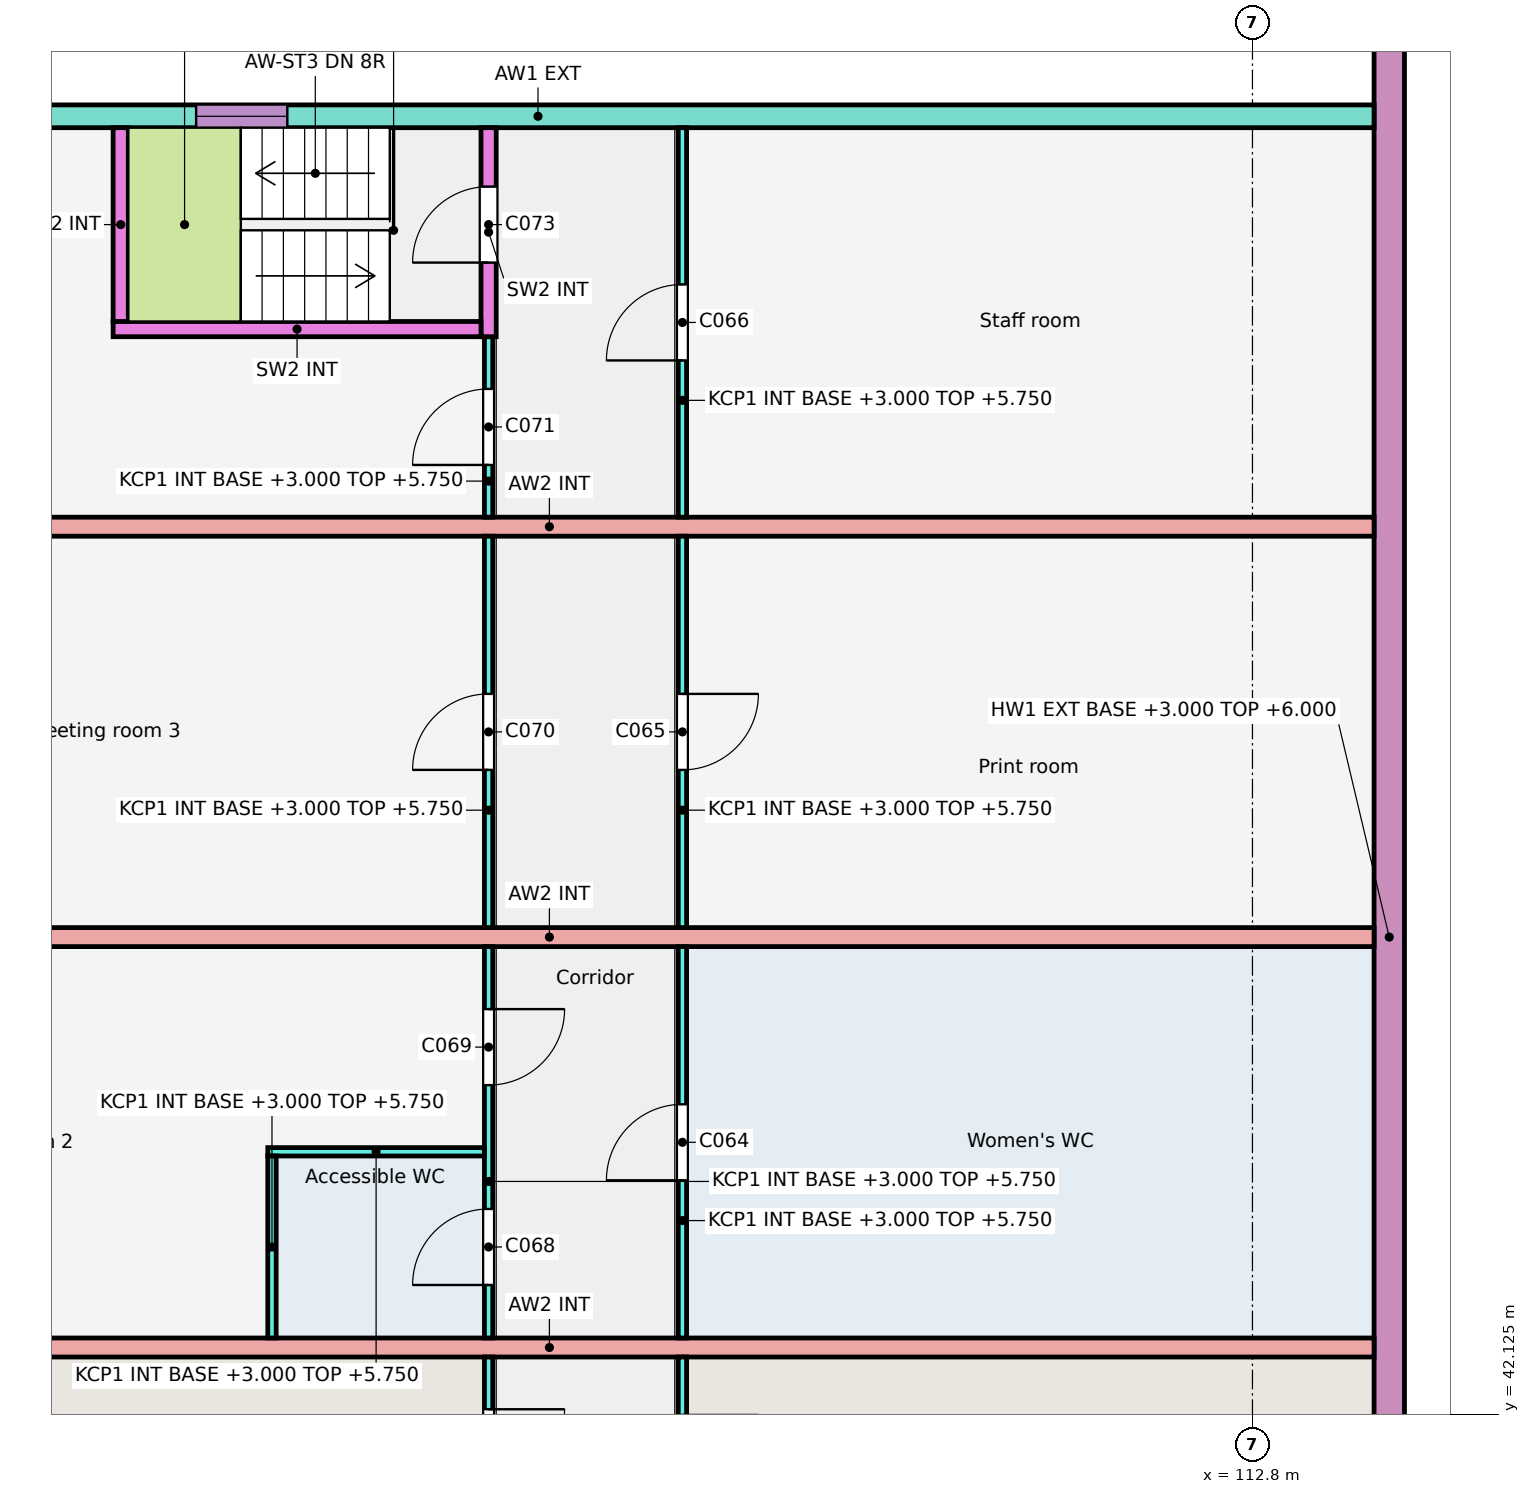
"""IFC4 building model, lengths in metres.
Left out: names, types, materials, properties, quantities, classifications, styles, units other than length and angle.
Written with IfcOpenShell. Run it as: python <this file> out.ifc"""

import sys

from ifc_helpers import new_model, si_unit, direction, frame, frame_2d, origin, place, context, subcontext, project, spatial, rectangle, extrude, element, fill, save


model = new_model("IFC4")
c1 = context("Model", 3, precision=1e-05, world=origin(), true_north=direction((0.0, 1.0)))
c2 = subcontext(c1, "Body", "Model", "MODEL_VIEW")
j1 = project(units=[si_unit("LENGTHUNIT", "METRE"), si_unit("PLANEANGLEUNIT", "RADIAN")], contexts=[c1])
p1 = place(None, origin())
s1 = spatial("IfcSite", under=j1, at=p1, CompositionType="ELEMENT")
p2 = place(p1, origin())
s2 = spatial("IfcBuilding", under=s1, at=p2, CompositionType="ELEMENT")
p3 = place(p2, frame((0.0, 0.0, 3.0)))
s3 = spatial("IfcBuildingStorey", under=s2, at=p3, CompositionType="ELEMENT", Elevation=3.0)
p4 = place(p3, frame((114.6, 32.0, 0.0), z_axis=(0.0, 0.0, 1.0), x_axis=(0.0, 1.0, 0.0)))
e1 = element("IfcWall", 1, at=p4, inside=s3, PredefinedType="SOLIDWALL", context=c2, shape_type="SweptSolid", body=[
    extrude(rectangle(XDim=32.8, YDim=0.4, at=frame_2d((16.4, 0.0))), origin(), (0.0, 0.0, 1.0), 3.0),
])
p5 = place(p4, frame((2.5, 0.0, 0.9)))
e2 = element("IfcOpeningElement", 2, at=p5, cuts=e1, PredefinedType="OPENING", context=c2, shape_type="SweptSolid", body=[
    extrude(rectangle(XDim=1.2, YDim=1.6, at=frame_2d((0.6, 0.8))), frame((0.0, 0.21, 0.0), z_axis=(0.0, -1.0, 0.0), x_axis=(1.0, 0.0, 0.0)), (0.0, 0.0, 1.0), 0.42),
])
p6 = place(p4, frame((29.3, 0.0, 0.9)))
e3 = element("IfcOpeningElement", 3, at=p6, cuts=e1, PredefinedType="OPENING", context=c2, shape_type="SweptSolid", body=[
    extrude(rectangle(XDim=1.2, YDim=1.6, at=frame_2d((0.6, 0.8))), frame((0.0, 0.21, 0.0), z_axis=(0.0, -1.0, 0.0), x_axis=(1.0, 0.0, 0.0)), (0.0, 0.0, 1.0), 0.42),
])
p7 = place(p3, frame((114.4, 59.2, 0.0), z_axis=(0.0, 0.0, 1.0), x_axis=(-1.0, 0.0, 0.0)))
e4 = element("IfcWall", 4, at=p7, inside=s3, PredefinedType="SOLIDWALL", context=c2, shape_type="SweptSolid", body=[
    extrude(rectangle(XDim=22.0, YDim=0.3, at=frame_2d((11.0, 0.0))), origin(), (0.0, 0.0, 1.0), 3.0),
])
p8 = place(p7, frame((14.298, 0.0, 0.9)))
e5 = element("IfcOpeningElement", 5, at=p8, cuts=e4, PredefinedType="OPENING", context=c2, shape_type="SweptSolid", body=[
    extrude(rectangle(XDim=1.2, YDim=1.5, at=frame_2d((0.6, 0.75))), frame((0.0, 0.16, 0.0), z_axis=(0.0, -1.0, 0.0), x_axis=(1.0, 0.0, 0.0)), (0.0, 0.0, 1.0), 0.32),
])
for number, where, z_axis, x_axis in (
    (6, (114.4, 43.0, 0.0), (0.0, 0.0, 1.0), (-1.0, 0.0, 0.0)),
    (7, (114.4, 48.4, 0.0), (0.0, 0.0, 1.0), (-1.0, 0.0, 0.0)),
    (8, (114.4, 53.8, 0.0), (0.0, 0.0, 1.0), (-1.0, 0.0, 0.0)),
):
    element("IfcWall", number, at=place(p3, frame(where, z_axis=z_axis, x_axis=x_axis)), inside=s3, PredefinedType="SOLIDWALL", context=c2, shape_type="SweptSolid", body=[
        extrude(rectangle(XDim=21.7, YDim=0.25, at=frame_2d((10.85, 0.0))), origin(), (0.0, 0.0, 1.0), 3.0),
    ])
p9 = place(p3, frame((105.3, 40.35, 0.0), z_axis=(0.0, 0.0, 1.0), x_axis=(0.0, 1.0, 0.0)))
e9 = element("IfcWall", 9, at=p9, inside=s3, PredefinedType="PARTITIONING", context=c2, shape_type="SweptSolid", body=[
    extrude(rectangle(XDim=2.525, YDim=0.11, at=frame_2d((1.262, 0.0))), origin(), (0.0, 0.0, 1.0), 2.75),
])
p10 = place(p9, frame((0.762, 0.0, 0.0)))
e10 = element("IfcOpeningElement", 10, at=p10, cuts=e9, PredefinedType="OPENING", context=c2, shape_type="SweptSolid", body=[
    extrude(rectangle(XDim=1.0, YDim=2.1, at=frame_2d((0.5, 1.05))), frame((0.0, 0.065, 0.0), z_axis=(0.0, -1.0, 0.0), x_axis=(1.0, 0.0, 0.0)), (0.0, 0.0, 1.0), 0.13),
])
p11 = place(p3, frame((105.3, 43.125, 0.0), z_axis=(0.0, 0.0, 1.0), x_axis=(0.0, 1.0, 0.0)))
e11 = element("IfcWall", 11, at=p11, inside=s3, PredefinedType="PARTITIONING", context=c2, shape_type="SweptSolid", body=[
    extrude(rectangle(XDim=5.15, YDim=0.11, at=frame_2d((2.575, 0.0))), origin(), (0.0, 0.0, 1.0), 2.75),
])
p12 = place(p11, frame((2.075, 0.0, 0.0)))
e12 = element("IfcOpeningElement", 12, at=p12, cuts=e11, PredefinedType="OPENING", context=c2, shape_type="SweptSolid", body=[
    extrude(rectangle(XDim=1.0, YDim=2.1, at=frame_2d((0.5, 1.05))), frame((0.0, 0.065, 0.0), z_axis=(0.0, -1.0, 0.0), x_axis=(1.0, 0.0, 0.0)), (0.0, 0.0, 1.0), 0.13),
])
p13 = place(p3, frame((105.3, 48.525, 0.0), z_axis=(0.0, 0.0, 1.0), x_axis=(0.0, 1.0, 0.0)))
e13 = element("IfcWall", 13, at=p13, inside=s3, PredefinedType="PARTITIONING", context=c2, shape_type="SweptSolid", body=[
    extrude(rectangle(XDim=5.15, YDim=0.11, at=frame_2d((2.575, 0.0))), origin(), (0.0, 0.0, 1.0), 2.75),
])
p14 = place(p13, frame((2.075, 0.0, 0.0)))
e14 = element("IfcOpeningElement", 14, at=p14, cuts=e13, PredefinedType="OPENING", context=c2, shape_type="SweptSolid", body=[
    extrude(rectangle(XDim=1.0, YDim=2.1, at=frame_2d((0.5, 1.05))), frame((0.0, 0.065, 0.0), z_axis=(0.0, -1.0, 0.0), x_axis=(1.0, 0.0, 0.0)), (0.0, 0.0, 1.0), 0.13),
])
p15 = place(p3, frame((105.3, 53.925, 0.0), z_axis=(0.0, 0.0, 1.0), x_axis=(0.0, 1.0, 0.0)))
e15 = element("IfcWall", 15, at=p15, inside=s3, PredefinedType="PARTITIONING", context=c2, shape_type="SweptSolid", body=[
    extrude(rectangle(XDim=5.125, YDim=0.11, at=frame_2d((2.562, 0.0))), origin(), (0.0, 0.0, 1.0), 2.75),
])
p16 = place(p15, frame((2.062, 0.0, 0.0)))
e16 = element("IfcOpeningElement", 16, at=p16, cuts=e15, PredefinedType="OPENING", context=c2, shape_type="SweptSolid", body=[
    extrude(rectangle(XDim=1.0, YDim=2.1, at=frame_2d((0.5, 1.05))), frame((0.0, 0.065, 0.0), z_axis=(0.0, -1.0, 0.0), x_axis=(1.0, 0.0, 0.0)), (0.0, 0.0, 1.0), 0.13),
])
p17 = place(p3, frame((102.75, 40.5, 0.0), z_axis=(0.0, 0.0, 1.0), x_axis=(0.0, 1.0, 0.0)))
e17 = element("IfcWall", 17, at=p17, inside=s3, PredefinedType="PARTITIONING", context=c2, shape_type="SweptSolid", body=[
    extrude(rectangle(XDim=2.375, YDim=0.11, at=frame_2d((1.188, 0.0))), origin(), (0.0, 0.0, 1.0), 2.75),
])
p18 = place(p17, frame((0.688, 0.0, 0.0)))
e18 = element("IfcOpeningElement", 18, at=p18, cuts=e17, PredefinedType="OPENING", context=c2, shape_type="SweptSolid", body=[
    extrude(rectangle(XDim=1.0, YDim=2.1, at=frame_2d((0.5, 1.05))), frame((0.0, 0.065, 0.0), z_axis=(0.0, -1.0, 0.0), x_axis=(1.0, 0.0, 0.0)), (0.0, 0.0, 1.0), 0.13),
])
p19 = place(p3, frame((102.75, 43.125, 0.0), z_axis=(0.0, 0.0, 1.0), x_axis=(0.0, 1.0, 0.0)))
e19 = element("IfcWall", 19, at=p19, inside=s3, PredefinedType="PARTITIONING", context=c2, shape_type="SweptSolid", body=[
    extrude(rectangle(XDim=5.15, YDim=0.11, at=frame_2d((2.575, 0.0))), origin(), (0.0, 0.0, 1.0), 2.75),
])
p20 = place(p19, frame((0.698, 0.0, 0.0)))
e20 = element("IfcOpeningElement", 20, at=p20, cuts=e19, PredefinedType="OPENING", context=c2, shape_type="SweptSolid", body=[
    extrude(rectangle(XDim=1.0, YDim=2.1, at=frame_2d((0.5, 1.05))), frame((0.0, 0.065, 0.0), z_axis=(0.0, -1.0, 0.0), x_axis=(1.0, 0.0, 0.0)), (0.0, 0.0, 1.0), 0.13),
])
p21 = place(p19, frame((3.327, 0.0, 0.0)))
e21 = element("IfcOpeningElement", 21, at=p21, cuts=e19, PredefinedType="OPENING", context=c2, shape_type="SweptSolid", body=[
    extrude(rectangle(XDim=1.0, YDim=2.1, at=frame_2d((0.5, 1.05))), frame((0.0, 0.065, 0.0), z_axis=(0.0, -1.0, 0.0), x_axis=(1.0, 0.0, 0.0)), (0.0, 0.0, 1.0), 0.13),
])
p22 = place(p3, frame((102.75, 48.525, 0.0), z_axis=(0.0, 0.0, 1.0), x_axis=(0.0, 1.0, 0.0)))
e22 = element("IfcWall", 22, at=p22, inside=s3, PredefinedType="PARTITIONING", context=c2, shape_type="SweptSolid", body=[
    extrude(rectangle(XDim=5.15, YDim=0.11, at=frame_2d((2.575, 0.0))), origin(), (0.0, 0.0, 1.0), 2.75),
])
p23 = place(p22, frame((2.075, 0.0, 0.0)))
e23 = element("IfcOpeningElement", 23, at=p23, cuts=e22, PredefinedType="OPENING", context=c2, shape_type="SweptSolid", body=[
    extrude(rectangle(XDim=1.0, YDim=2.1, at=frame_2d((0.5, 1.05))), frame((0.0, 0.065, 0.0), z_axis=(0.0, -1.0, 0.0), x_axis=(1.0, 0.0, 0.0)), (0.0, 0.0, 1.0), 0.13),
])
p24 = place(p3, frame((102.75, 53.925, 0.0), z_axis=(0.0, 0.0, 1.0), x_axis=(0.0, 1.0, 0.0)))
e24 = element("IfcWall", 24, at=p24, inside=s3, PredefinedType="PARTITIONING", context=c2, shape_type="SweptSolid", body=[
    extrude(rectangle(XDim=2.375, YDim=0.11, at=frame_2d((1.188, 0.0))), origin(), (0.0, 0.0, 1.0), 2.75),
])
p25 = place(p24, frame((0.688, 0.0, 0.0)))
e25 = element("IfcOpeningElement", 25, at=p25, cuts=e24, PredefinedType="OPENING", context=c2, shape_type="SweptSolid", body=[
    extrude(rectangle(XDim=1.0, YDim=2.1, at=frame_2d((0.5, 1.05))), frame((0.0, 0.065, 0.0), z_axis=(0.0, -1.0, 0.0), x_axis=(1.0, 0.0, 0.0)), (0.0, 0.0, 1.0), 0.13),
])
p26 = place(p3, frame((102.75, 56.3, 0.0), z_axis=(0.0, 0.0, 1.0), x_axis=(0.0, 1.0, 0.0)))
e26 = element("IfcWall", 26, at=p26, inside=s3, PredefinedType="SOLIDWALL", context=c2, shape_type="SweptSolid", body=[
    extrude(rectangle(XDim=2.75, YDim=0.2, at=frame_2d((1.375, 0.0))), origin(), (0.0, 0.0, 1.0), 2.75),
])
p27 = place(p26, frame((0.975, 0.0, 0.0)))
e27 = element("IfcOpeningElement", 27, at=p27, cuts=e26, PredefinedType="OPENING", context=c2, shape_type="SweptSolid", body=[
    extrude(rectangle(XDim=1.0, YDim=2.1, at=frame_2d((0.5, 1.05))), frame((0.0, 0.11, 0.0), z_axis=(0.0, -1.0, 0.0), x_axis=(1.0, 0.0, 0.0)), (0.0, 0.0, 1.0), 0.22),
])
p28 = place(p3, frame((102.65, 56.4, 0.0), z_axis=(0.0, 0.0, 1.0), x_axis=(-1.0, 0.0, 0.0)))
e28 = element("IfcWall", 28, at=p28, inside=s3, PredefinedType="SOLIDWALL", context=c2, shape_type="SweptSolid", body=[
    extrude(rectangle(XDim=4.84, YDim=0.2, at=frame_2d((2.42, 0.0))), origin(), (0.0, 0.0, 1.0), 2.75),
])
p29 = place(p3, frame((97.91, 59.05, 0.0), z_axis=(0.0, 0.0, 1.0), x_axis=(0.0, -1.0, 0.0)))
e29 = element("IfcWall", 29, at=p29, inside=s3, PredefinedType="SOLIDWALL", context=c2, shape_type="SweptSolid", body=[
    extrude(rectangle(XDim=2.55, YDim=0.2, at=frame_2d((1.275, 0.0))), origin(), (0.0, 0.0, 1.0), 2.75),
])
p30 = place(p3, frame((102.695, 45.575, 0.0), z_axis=(0.0, 0.0, 1.0), x_axis=(-1.0, 0.0, 0.0)))
e30 = element("IfcWall", 30, at=p30, inside=s3, PredefinedType="PARTITIONING", context=c2, shape_type="SweptSolid", body=[
    extrude(rectangle(XDim=2.85, YDim=0.11, at=frame_2d((1.425, 0.0))), origin(), (0.0, 0.0, 1.0), 2.75),
])
p31 = place(p3, frame((99.9, 43.125, 0.0), z_axis=(0.0, 0.0, 1.0), x_axis=(0.0, 1.0, 0.0)))
e31 = element("IfcWall", 31, at=p31, inside=s3, PredefinedType="PARTITIONING", context=c2, shape_type="SweptSolid", body=[
    extrude(rectangle(XDim=2.395, YDim=0.11, at=frame_2d((1.198, 0.0))), origin(), (0.0, 0.0, 1.0), 2.75),
])
p32 = place(p8, origin())
e32 = element("IfcWindow", 32, at=p32, inside=s3, PartitioningType="SINGLE_PANEL", PredefinedType="WINDOW", context=c2, shape_type="SweptSolid", body=[
    extrude(rectangle(XDim=1.2, YDim=1.5, at=frame_2d((0.6, 0.75))), frame((0.0, 0.03, 0.0), z_axis=(0.0, -1.0, 0.0), x_axis=(1.0, 0.0, 0.0)), (0.0, 0.0, 1.0), 0.06),
])
fill(e5, e32)
p33 = place(p12, origin())
e33 = element("IfcDoor", 33, at=p33, inside=s3, OperationType="SINGLE_SWING_LEFT", PredefinedType="DOOR", context=c2, shape_type="SweptSolid", body=[
    extrude(rectangle(XDim=1.0, YDim=2.1, at=frame_2d((0.5, 1.05))), frame((0.0, 0.025, 0.0), z_axis=(0.0, -1.0, 0.0), x_axis=(1.0, 0.0, 0.0)), (0.0, 0.0, 1.0), 0.05),
])
fill(e12, e33)
p34 = place(p14, origin())
e34 = element("IfcDoor", 34, at=p34, inside=s3, OperationType="SINGLE_SWING_RIGHT", PredefinedType="DOOR", context=c2, shape_type="SweptSolid", body=[
    extrude(rectangle(XDim=1.0, YDim=2.1, at=frame_2d((0.5, 1.05))), frame((0.0, 0.025, 0.0), z_axis=(0.0, -1.0, 0.0), x_axis=(1.0, 0.0, 0.0)), (0.0, 0.0, 1.0), 0.05),
])
fill(e14, e34)
p35 = place(p16, origin())
e35 = element("IfcDoor", 35, at=p35, inside=s3, OperationType="SINGLE_SWING_LEFT", PredefinedType="DOOR", context=c2, shape_type="SweptSolid", body=[
    extrude(rectangle(XDim=1.0, YDim=2.1, at=frame_2d((0.5, 1.05))), frame((0.0, 0.025, 0.0), z_axis=(0.0, -1.0, 0.0), x_axis=(1.0, 0.0, 0.0)), (0.0, 0.0, 1.0), 0.05),
])
fill(e16, e35)
p36 = place(p18, origin())
e36 = element("IfcDoor", 36, at=p36, inside=s3, OperationType="SINGLE_SWING_RIGHT", PredefinedType="DOOR", context=c2, shape_type="SweptSolid", body=[
    extrude(rectangle(XDim=1.0, YDim=2.1, at=frame_2d((0.5, 1.05))), frame((0.0, 0.025, 0.0), z_axis=(0.0, -1.0, 0.0), x_axis=(1.0, 0.0, 0.0)), (0.0, 0.0, 1.0), 0.05),
])
fill(e18, e36)
p37 = place(p20, origin())
e37 = element("IfcDoor", 37, at=p37, inside=s3, OperationType="SINGLE_SWING_LEFT", PredefinedType="DOOR", context=c2, shape_type="SweptSolid", body=[
    extrude(rectangle(XDim=1.0, YDim=2.1, at=frame_2d((0.5, 1.05))), frame((0.0, 0.025, 0.0), z_axis=(0.0, -1.0, 0.0), x_axis=(1.0, 0.0, 0.0)), (0.0, 0.0, 1.0), 0.05),
])
fill(e20, e37)
p38 = place(p21, origin())
e38 = element("IfcDoor", 38, at=p38, inside=s3, OperationType="SINGLE_SWING_RIGHT", PredefinedType="DOOR", context=c2, shape_type="SweptSolid", body=[
    extrude(rectangle(XDim=1.0, YDim=2.1, at=frame_2d((0.5, 1.05))), frame((0.0, 0.025, 0.0), z_axis=(0.0, -1.0, 0.0), x_axis=(1.0, 0.0, 0.0)), (0.0, 0.0, 1.0), 0.05),
])
fill(e21, e38)
p39 = place(p23, origin())
e39 = element("IfcDoor", 39, at=p39, inside=s3, OperationType="SINGLE_SWING_LEFT", PredefinedType="DOOR", context=c2, shape_type="SweptSolid", body=[
    extrude(rectangle(XDim=1.0, YDim=2.1, at=frame_2d((0.5, 1.05))), frame((0.0, 0.025, 0.0), z_axis=(0.0, -1.0, 0.0), x_axis=(1.0, 0.0, 0.0)), (0.0, 0.0, 1.0), 0.05),
])
fill(e23, e39)
p40 = place(p25, origin())
e40 = element("IfcDoor", 40, at=p40, inside=s3, OperationType="SINGLE_SWING_LEFT", PredefinedType="DOOR", context=c2, shape_type="SweptSolid", body=[
    extrude(rectangle(XDim=1.0, YDim=2.1, at=frame_2d((0.5, 1.05))), frame((0.0, 0.025, 0.0), z_axis=(0.0, -1.0, 0.0), x_axis=(1.0, 0.0, 0.0)), (0.0, 0.0, 1.0), 0.05),
])
fill(e25, e40)
p41 = place(p27, origin())
e41 = element("IfcDoor", 41, at=p41, inside=s3, OperationType="SINGLE_SWING_LEFT", PredefinedType="DOOR", context=c2, shape_type="SweptSolid", body=[
    extrude(rectangle(XDim=1.0, YDim=2.1, at=frame_2d((0.5, 1.05))), frame((0.0, 0.025, 0.0), z_axis=(0.0, -1.0, 0.0), x_axis=(1.0, 0.0, 0.0)), (0.0, 0.0, 1.0), 0.05),
])
fill(e27, e41)
save(model, sys.argv[1])
